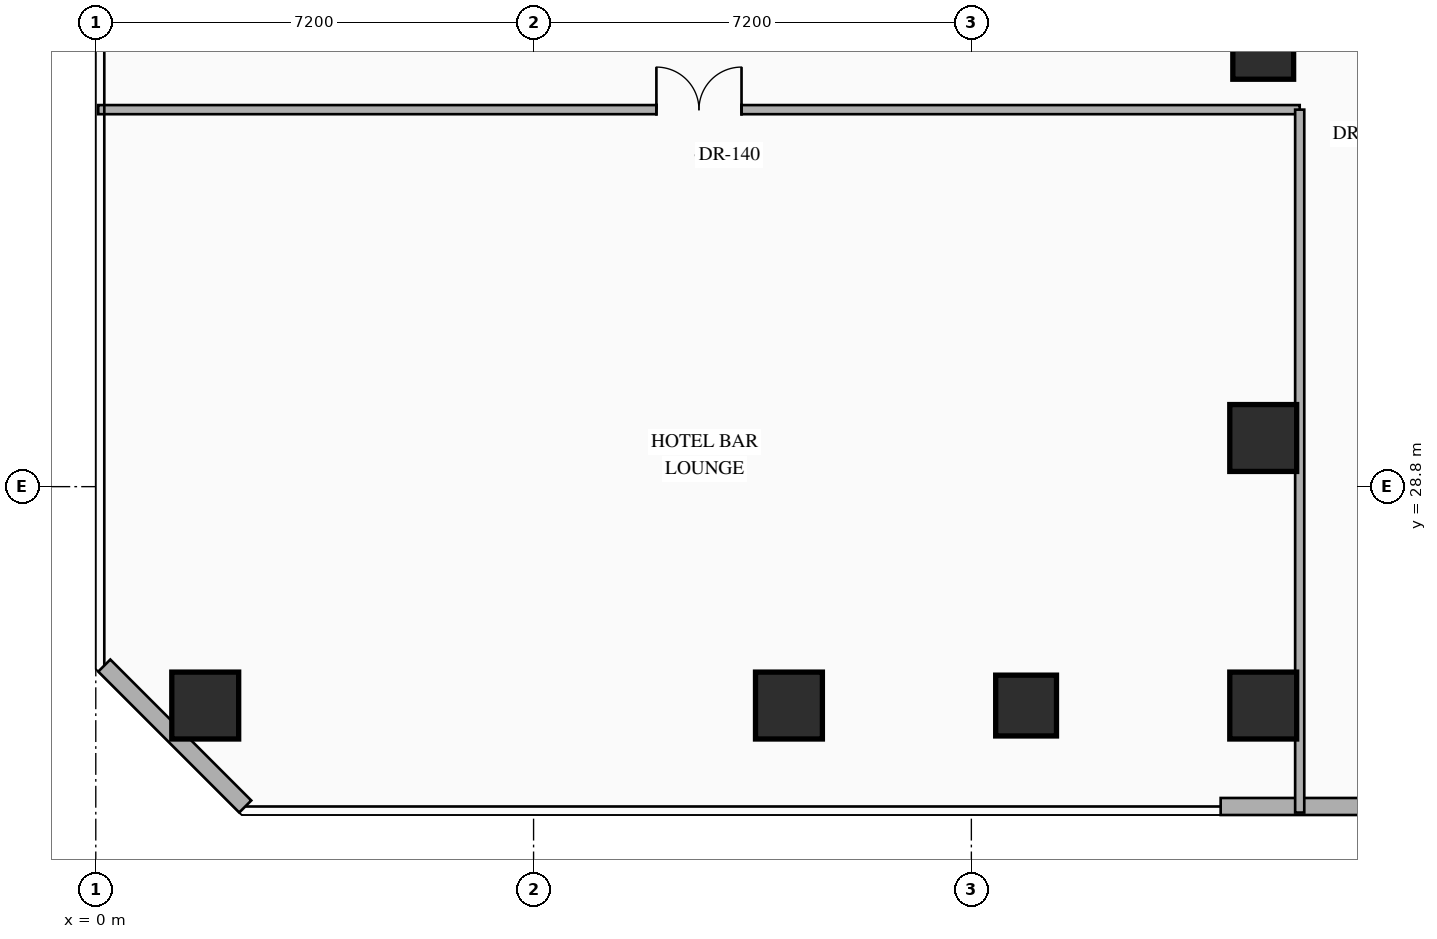
"""IFC4 building model, lengths in metres.
Left out: names, types, materials, properties, quantities, classifications, styles, units other than length and angle.
Written with IfcOpenShell. Run it as: python <this file> out.ifc"""

import sys

from ifc_helpers import new_model, si_unit, direction, frame, frame_2d, origin, origin_2d, place, context, subcontext, project, spatial, rectangle, hollow_rectangle, extrude, element, fill, save


model = new_model("IFC4")
c1 = context("Model", 3, precision=1e-05, world=origin(), true_north=direction((0.0, 1.0)))
c2 = subcontext(c1, "Body", "Model", "MODEL_VIEW")
j1 = project(units=[si_unit("LENGTHUNIT", "METRE"), si_unit("PLANEANGLEUNIT", "RADIAN")], contexts=[c1])
p1 = place(None, origin())
s1 = spatial("IfcSite", under=j1, at=p1, CompositionType="ELEMENT")
p2 = place(p1, origin())
s2 = spatial("IfcBuilding", under=s1, at=p2, CompositionType="ELEMENT")
p3 = place(p2, frame((0.0, 0.0, 32.1)))
s3 = spatial("IfcBuildingStorey", under=s2, at=p3, CompositionType="ELEMENT", Elevation=32.1)
for number, where, z_axis, x_axis in (
    (1, (1.8, 25.2, 0.0), (0.0, 0.0, 1.0), (1.0, 0.0, 0.0)),
    (2, (11.4, 25.2, 0.0), (0.0, 0.0, 1.0), (1.0, 0.0, 0.0)),
    (3, (19.2, 25.2, 0.0), (0.0, 0.0, 1.0), (1.0, 0.0, 0.0)),
    (4, (19.2, 29.6, 0.0), (0.0, 0.0, 1.0), (1.0, 0.0, 0.0)),
):
    element("IfcColumn", number, at=place(p3, frame(where, z_axis=z_axis, x_axis=x_axis)), inside=s3, PredefinedType="COLUMN", context=c2, shape_type="SweptSolid", body=[
        extrude(hollow_rectangle(XDim=1.1, YDim=1.1, WallThickness=0.04, at=origin_2d()), origin(), (0.0, 0.0, 1.0), 4.5),
    ])
for number, where, z_axis, x_axis in (
    (5, (19.2, 36.0, 0.0), (0.0, 0.0, 1.0), (1.0, 0.0, 0.0)),
    (6, (15.3, 25.2, 0.0), (0.0, 0.0, 1.0), (1.0, 0.0, 0.0)),
):
    element("IfcColumn", number, at=place(p3, frame(where, z_axis=z_axis, x_axis=x_axis)), inside=s3, PredefinedType="COLUMN", context=c2, shape_type="SweptSolid", body=[
        extrude(hollow_rectangle(XDim=1.0, YDim=1.0, WallThickness=0.038, at=origin_2d()), origin(), (0.0, 0.0, 1.0), 4.5),
    ])
p4 = place(p3, frame((25.247, 23.54, 0.0), z_axis=(0.0, 0.0, 1.0), x_axis=(-1.0, 0.0, 0.0)))
e7 = element("IfcWall", 7, at=p4, inside=s3, PredefinedType="STANDARD", context=c2, shape_type="SweptSolid", body=[
    extrude(rectangle(XDim=6.747, YDim=0.28, at=frame_2d((3.374, 0.0))), origin(), (0.0, 0.0, 1.0), 4.28),
])
p5 = place(p3, frame((2.458, 23.54, 0.0), z_axis=(0.0, 0.0, 1.0), x_axis=(-0.707144017911, 0.707069542501, 0.0)))
e8 = element("IfcWall", 8, at=p5, inside=s3, PredefinedType="STANDARD", context=c2, shape_type="SweptSolid", body=[
    extrude(rectangle(XDim=3.278, YDim=0.28, at=frame_2d((1.639, 0.0))), origin(), (0.0, 0.0, 1.0), 4.28),
])
p6 = place(p3, frame((0.04, 35.0, 0.0), z_axis=(0.0, 0.0, 1.0), x_axis=(1.0, 0.0, 0.0)))
e9 = element("IfcWall", 9, at=p6, inside=s3, PredefinedType="PARTITIONING", context=c2, shape_type="SweptSolid", body=[
    extrude(rectangle(XDim=19.76, YDim=0.15, at=frame_2d((9.88, 0.0))), origin(), (0.0, 0.0, 1.0), 4.28),
])
p7 = place(p6, frame((9.18, 0.0, 0.0)))
e10 = element("IfcOpeningElement", 10, at=p7, cuts=e9, PredefinedType="OPENING", context=c2, shape_type="SweptSolid", body=[
    extrude(rectangle(XDim=1.4, YDim=2.3, at=frame_2d((0.7, 1.15))), frame((0.0, 0.085, 0.0), z_axis=(0.0, -1.0, 0.0), x_axis=(1.0, 0.0, 0.0)), (0.0, 0.0, 1.0), 0.17),
])
p8 = place(p3, frame((19.8, 23.44, 0.0), z_axis=(0.0, 0.0, 1.0), x_axis=(0.0, 1.0, 0.0)))
e11 = element("IfcWall", 11, at=p8, inside=s3, PredefinedType="PARTITIONING", context=c2, shape_type="SweptSolid", body=[
    extrude(rectangle(XDim=11.56, YDim=0.15, at=frame_2d((5.78, 0.0))), origin(), (0.0, 0.0, 1.0), 4.28),
])
p9 = place(p7, origin())
e12 = element("IfcDoor", 12, at=p9, inside=s3, OperationType="DOUBLE_DOOR_SINGLE_SWING", PredefinedType="DOOR", context=c2, shape_type="SweptSolid", body=[
    extrude(rectangle(XDim=1.4, YDim=2.3, at=frame_2d((0.7, 1.15))), frame((0.0, 0.025, 0.0), z_axis=(0.0, -1.0, 0.0), x_axis=(1.0, 0.0, 0.0)), (0.0, 0.0, 1.0), 0.05),
])
fill(e10, e12)
save(model, sys.argv[1])
